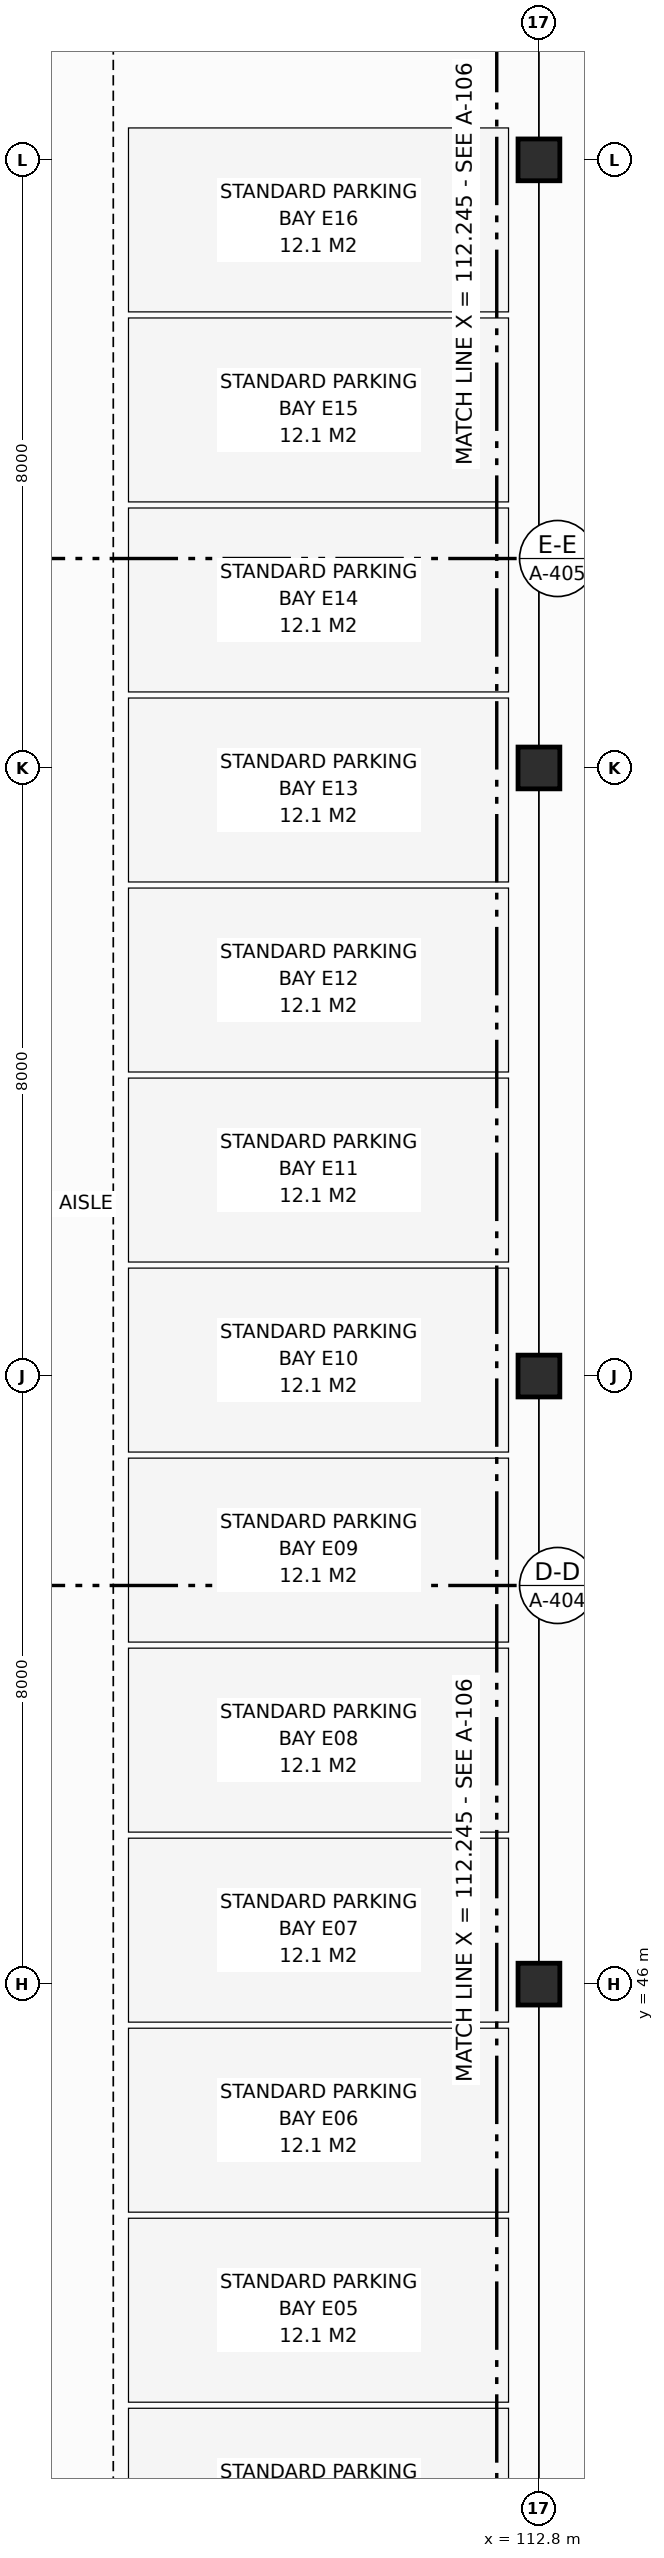
"""IFC4 building model, lengths in metres.
Left out: names, types, materials, properties, quantities, classifications, styles, units other than length and angle.
Written with IfcOpenShell. Run it as: python <this file> out.ifc"""

import sys

from ifc_helpers import new_model, si_unit, direction, frame, origin, origin_2d, place, context, subcontext, project, spatial, rectangle, extrude, element, save


model = new_model("IFC4")
c1 = context("Model", 3, precision=1e-05, world=origin(), true_north=direction((0.0, 1.0)))
c2 = subcontext(c1, "Body", "Model", "MODEL_VIEW")
j1 = project(units=[si_unit("LENGTHUNIT", "METRE"), si_unit("PLANEANGLEUNIT", "RADIAN")], contexts=[c1])
p1 = place(None, origin())
s1 = spatial("IfcSite", under=j1, at=p1, CompositionType="ELEMENT")
p2 = place(p1, origin())
s2 = spatial("IfcBuilding", under=s1, at=p2, CompositionType="ELEMENT")
p3 = place(p2, frame((0.0, 0.0, -3.8)))
s3 = spatial("IfcBuildingStorey", under=s2, at=p3, CompositionType="ELEMENT", Elevation=-3.8)
for number, where, z_axis, x_axis in (
    (1, (112.8, 46.0, 0.0), (0.0, 0.0, 1.0), (1.0, 0.0, 0.0)),
    (2, (112.8, 54.0, 0.0), (0.0, 0.0, 1.0), (1.0, 0.0, 0.0)),
    (3, (112.8, 62.0, 0.0), (0.0, 0.0, 1.0), (1.0, 0.0, 0.0)),
    (4, (112.8, 70.0, 0.0), (0.0, 0.0, 1.0), (1.0, 0.0, 0.0)),
):
    element("IfcColumn", number, at=place(p3, frame(where, z_axis=z_axis, x_axis=x_axis)), inside=s3, PredefinedType="COLUMN", context=c2, shape_type="SweptSolid", body=[
        extrude(rectangle(XDim=0.55, YDim=0.55, at=origin_2d()), origin(), (0.0, 0.0, 1.0), 3.8),
    ])
save(model, sys.argv[1])
